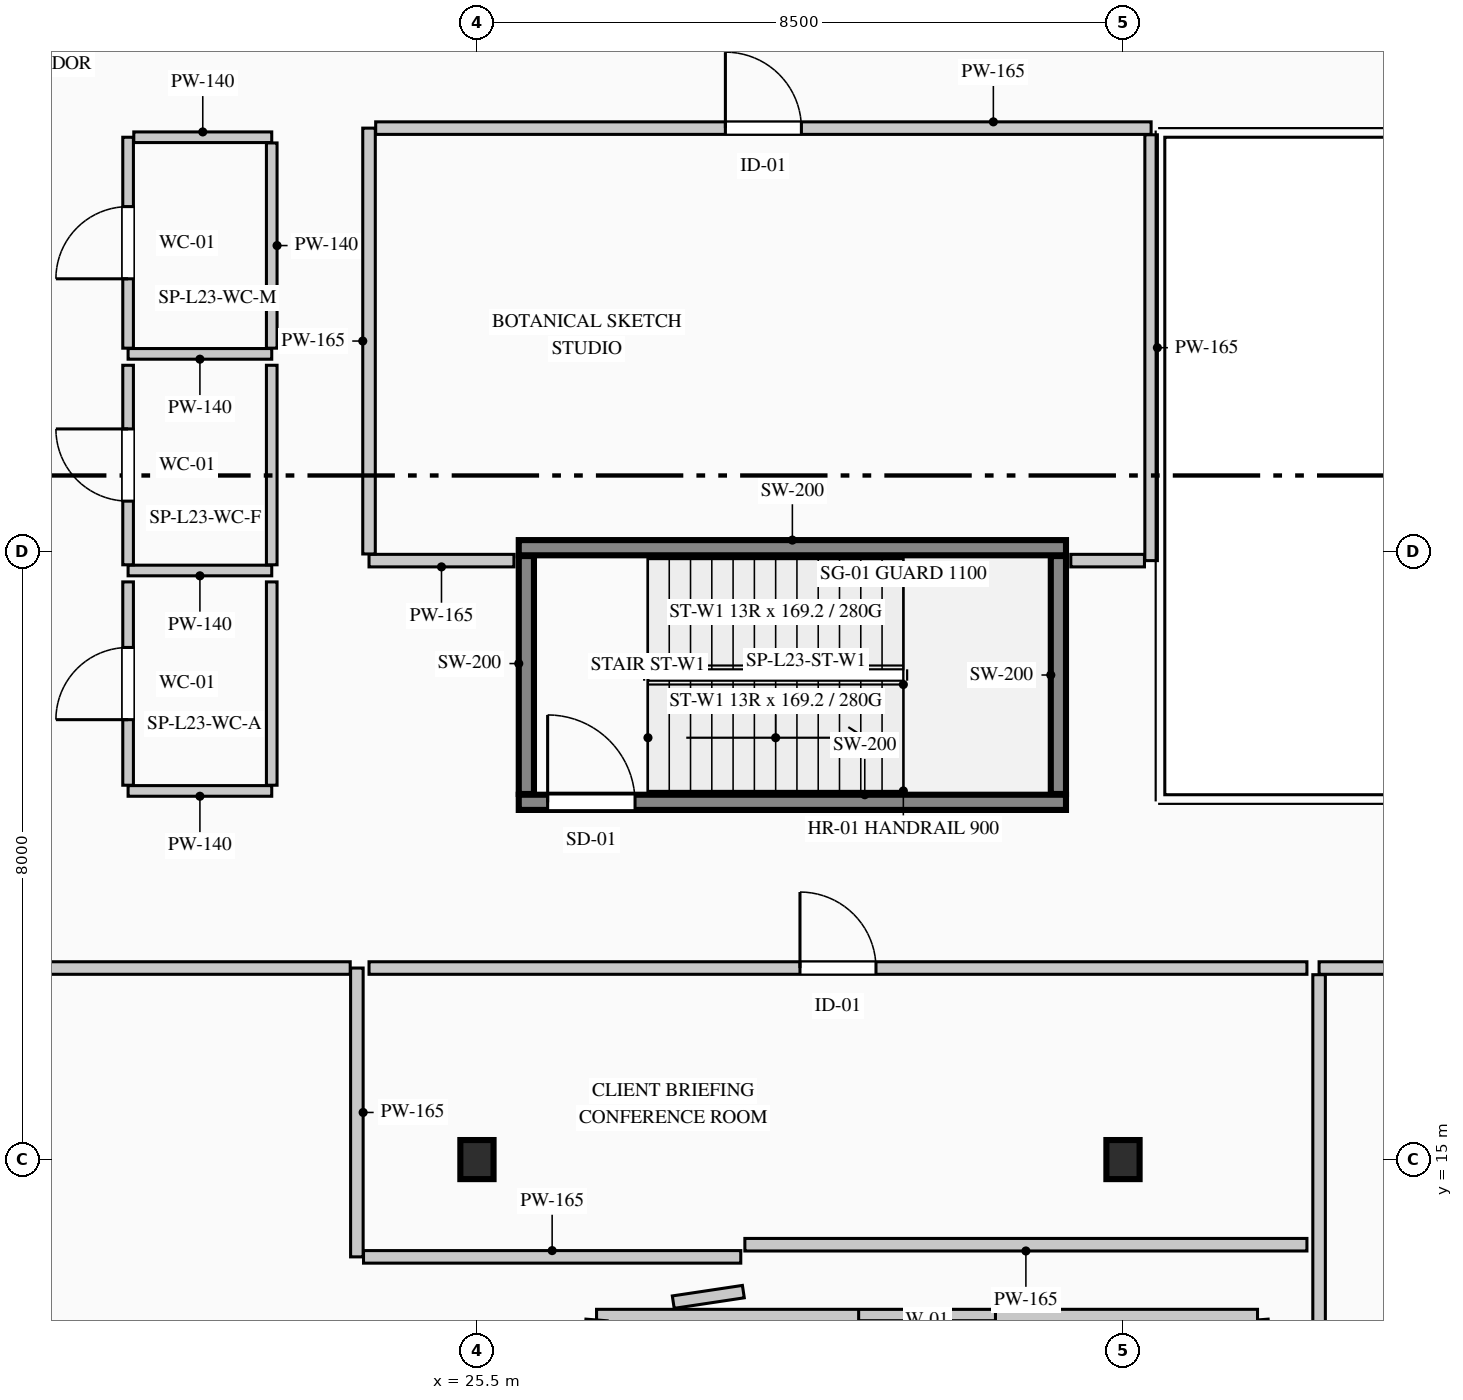
"""IFC4 building model, lengths in metres.
Left out: names, types, materials, properties, quantities, classifications, styles, units other than length and angle.
Written with IfcOpenShell. Run it as: python <this file> out.ifc"""

import sys

from ifc_helpers import new_model, si_unit, direction, frame, frame_2d, origin, origin_2d, place, context, subcontext, project, spatial, rectangle, i_section, extrude, element, fill, save


model = new_model("IFC4")
c1 = context("Model", 3, precision=1e-05, world=origin(), true_north=direction((0.0, 1.0)))
c2 = subcontext(c1, "Body", "Model", "MODEL_VIEW")
j1 = project(units=[si_unit("LENGTHUNIT", "METRE"), si_unit("PLANEANGLEUNIT", "RADIAN")], contexts=[c1])
p1 = place(None, origin())
s1 = spatial("IfcSite", under=j1, at=p1, CompositionType="ELEMENT")
p2 = place(p1, origin())
s2 = spatial("IfcBuilding", under=s1, at=p2, CompositionType="ELEMENT")
p3 = place(p2, frame((0.0, 0.0, 101.8)))
s3 = spatial("IfcBuildingStorey", under=s2, at=p3, CompositionType="ELEMENT", Elevation=101.8)
p4 = place(p3, frame((26.05, 19.7, 0.0), z_axis=(0.0, 0.0, 1.0), x_axis=(1.0, 0.0, 0.0)))
e1 = element("IfcWall", 1, at=p4, inside=s3, PredefinedType="SHEAR", context=c2, shape_type="SweptSolid", body=[
    extrude(rectangle(XDim=7.2, YDim=0.2, at=frame_2d((3.6, 0.0))), origin(), (0.0, 0.0, 1.0), 4.4),
])
p5 = place(p4, frame((0.38, 0.0, 0.0)))
e2 = element("IfcOpeningElement", 2, at=p5, cuts=e1, PredefinedType="OPENING", context=c2, shape_type="SweptSolid", body=[
    extrude(rectangle(XDim=1.15, YDim=2.2, at=frame_2d((0.575, 1.1))), frame((0.0, 0.11, 0.0), z_axis=(0.0, -1.0, 0.0), x_axis=(1.0, 0.0, 0.0)), (0.0, 0.0, 1.0), 0.22),
])
p6 = place(p3, frame((26.05, 23.05, 0.0), z_axis=(0.0, 0.0, 1.0), x_axis=(1.0, 0.0, 0.0)))
e3 = element("IfcWall", 3, at=p6, inside=s3, PredefinedType="SHEAR", context=c2, shape_type="SweptSolid", body=[
    extrude(rectangle(XDim=7.2, YDim=0.2, at=frame_2d((3.6, 0.0))), origin(), (0.0, 0.0, 1.0), 4.4),
])
for number, where, z_axis, x_axis in (
    (4, (26.15, 19.81, 0.0), (0.0, 0.0, 1.0), (0.0, 1.0, 0.0)),
    (5, (33.15, 19.81, 0.0), (0.0, 0.0, 1.0), (0.0, 1.0, 0.0)),
):
    element("IfcWall", number, at=place(p3, frame(where, z_axis=z_axis, x_axis=x_axis)), inside=s3, PredefinedType="SHEAR", context=c2, shape_type="SweptSolid", body=[
        extrude(rectangle(XDim=3.13, YDim=0.2, at=frame_2d((1.565, 0.0))), origin(), (0.0, 0.0, 1.0), 4.4),
    ])
for number, where, z_axis, x_axis in (
    (6, (25.5, 15.0, 0.0), (0.0, 0.0, 1.0), (1.0, 0.0, 0.0)),
    (7, (34.0, 15.0, 0.0), (0.0, 0.0, 1.0), (1.0, 0.0, 0.0)),
):
    element("IfcColumn", number, at=place(p3, frame(where, z_axis=z_axis, x_axis=x_axis)), inside=s3, PredefinedType="COLUMN", context=c2, shape_type="SweptSolid", body=[
        extrude(i_section(OverallWidth=0.437, OverallDepth=0.514, WebThickness=0.061, FlangeThickness=0.077, FilletRadius=0.015, at=origin_2d()), origin(), (0.0, 0.0, 1.0), 4.4),
    ])
p7 = place(p3, frame((36.57, 2.64, 0.0), z_axis=(0.0, 0.0, 1.0), x_axis=(-0.077816860153, 0.996967670627, 0.0)))
e8 = element("IfcWall", 8, at=p7, inside=s3, PredefinedType="STANDARD", context=c2, shape_type="SweptSolid", body=[
    extrude(rectangle(XDim=10.281, YDim=0.28, at=frame_2d((5.141, 0.0))), origin(), (0.0, 0.0, 1.0), 4.05),
])
p8 = place(p7, frame((5.68, 0.0, 0.9)))
e9 = element("IfcOpeningElement", 9, at=p8, cuts=e8, PredefinedType="OPENING", context=c2, shape_type="SweptSolid", body=[
    extrude(rectangle(XDim=1.8, YDim=2.1, at=frame_2d((0.9, 1.05))), frame((0.0, 0.15, 0.0), z_axis=(0.0, -1.0, 0.0), x_axis=(1.0, 0.0, 0.0)), (0.0, 0.0, 1.0), 0.3),
])
p9 = place(p3, frame((35.77, 12.89, 0.0), z_axis=(0.0, 0.0, 1.0), x_axis=(-1.0, 0.0, 0.0)))
e10 = element("IfcWall", 10, at=p9, inside=s3, PredefinedType="STANDARD", context=c2, shape_type="SweptSolid", body=[
    extrude(rectangle(XDim=8.697, YDim=0.28, at=frame_2d((4.348, 0.0))), origin(), (0.0, 0.0, 1.0), 4.05),
])
p10 = place(p9, frame((3.448, 0.0, 0.9)))
e11 = element("IfcOpeningElement", 11, at=p10, cuts=e10, PredefinedType="OPENING", context=c2, shape_type="SweptSolid", body=[
    extrude(rectangle(XDim=1.8, YDim=2.1, at=frame_2d((0.9, 1.05))), frame((0.0, 0.15, 0.0), z_axis=(0.0, -1.0, 0.0), x_axis=(1.0, 0.0, 0.0)), (0.0, 0.0, 1.0), 0.3),
])
p11 = place(p3, frame((27.073, 12.89, 0.0), z_axis=(0.0, 0.0, 1.0), x_axis=(-0.077816860153, -0.996967670627, 0.0)))
e12 = element("IfcWall", 12, at=p11, inside=s3, PredefinedType="STANDARD", context=c2, shape_type="SweptSolid", body=[
    extrude(rectangle(XDim=10.281, YDim=0.28, at=frame_2d((5.141, 0.0))), origin(), (0.0, 0.0, 1.0), 4.05),
])
p12 = place(p11, frame((2.801, 0.0, 0.9)))
e13 = element("IfcOpeningElement", 13, at=p12, cuts=e12, PredefinedType="OPENING", context=c2, shape_type="SweptSolid", body=[
    extrude(rectangle(XDim=1.8, YDim=2.1, at=frame_2d((0.9, 1.05))), frame((0.0, 0.15, 0.0), z_axis=(0.0, -1.0, 0.0), x_axis=(1.0, 0.0, 0.0)), (0.0, 0.0, 1.0), 0.3),
])
p13 = place(p3, frame((22.8, 25.6, 0.0), z_axis=(0.0, 0.0, 1.0), x_axis=(-1.0, 0.0, 0.0)))
e14 = element("IfcWall", 14, at=p13, inside=s3, PredefinedType="PARTITIONING", context=c2, shape_type="SweptSolid", body=[
    extrude(rectangle(XDim=1.89, YDim=0.14, at=frame_2d((0.945, 0.0))), origin(), (0.0, 0.0, 1.0), 4.05),
])
p14 = place(p3, frame((20.91, 25.675, 0.0), z_axis=(0.0, 0.0, 1.0), x_axis=(0.0, 1.0, 0.0)))
e15 = element("IfcWall", 15, at=p14, inside=s3, PredefinedType="PARTITIONING", context=c2, shape_type="SweptSolid", body=[
    extrude(rectangle(XDim=2.775, YDim=0.14, at=frame_2d((1.387, 0.0))), origin(), (0.0, 0.0, 1.0), 4.05),
])
p15 = place(p14, frame((0.913, 0.0, 0.0)))
e16 = element("IfcOpeningElement", 16, at=p15, cuts=e15, PredefinedType="OPENING", context=c2, shape_type="SweptSolid", body=[
    extrude(rectangle(XDim=0.95, YDim=2.15, at=frame_2d((0.475, 1.075))), frame((0.0, 0.08, 0.0), z_axis=(0.0, -1.0, 0.0), x_axis=(1.0, 0.0, 0.0)), (0.0, 0.0, 1.0), 0.16),
])
p16 = place(p3, frame((20.985, 28.45, 0.0), z_axis=(0.0, 0.0, 1.0), x_axis=(1.0, 0.0, 0.0)))
e17 = element("IfcWall", 17, at=p16, inside=s3, PredefinedType="PARTITIONING", context=c2, shape_type="SweptSolid", body=[
    extrude(rectangle(XDim=1.815, YDim=0.14, at=frame_2d((0.907, 0.0))), origin(), (0.0, 0.0, 1.0), 4.05),
])
p17 = place(p3, frame((22.8, 28.375, 0.0), z_axis=(0.0, 0.0, 1.0), x_axis=(0.0, -1.0, 0.0)))
e18 = element("IfcWall", 18, at=p17, inside=s3, PredefinedType="PARTITIONING", context=c2, shape_type="SweptSolid", body=[
    extrude(rectangle(XDim=2.7, YDim=0.14, at=frame_2d((1.35, 0.0))), origin(), (0.0, 0.0, 1.0), 3.635),
])
p18 = place(p3, frame((22.8, 22.75, 0.0), z_axis=(0.0, 0.0, 1.0), x_axis=(-1.0, 0.0, 0.0)))
e19 = element("IfcWall", 19, at=p18, inside=s3, PredefinedType="PARTITIONING", context=c2, shape_type="SweptSolid", body=[
    extrude(rectangle(XDim=1.89, YDim=0.14, at=frame_2d((0.945, 0.0))), origin(), (0.0, 0.0, 1.0), 4.05),
])
p19 = place(p3, frame((20.91, 22.825, 0.0), z_axis=(0.0, 0.0, 1.0), x_axis=(0.0, 1.0, 0.0)))
e20 = element("IfcWall", 20, at=p19, inside=s3, PredefinedType="PARTITIONING", context=c2, shape_type="SweptSolid", body=[
    extrude(rectangle(XDim=2.625, YDim=0.14, at=frame_2d((1.312, 0.0))), origin(), (0.0, 0.0, 1.0), 4.05),
])
p20 = place(p19, frame((0.837, 0.0, 0.0)))
e21 = element("IfcOpeningElement", 21, at=p20, cuts=e20, PredefinedType="OPENING", context=c2, shape_type="SweptSolid", body=[
    extrude(rectangle(XDim=0.95, YDim=2.15, at=frame_2d((0.475, 1.075))), frame((0.0, 0.08, 0.0), z_axis=(0.0, -1.0, 0.0), x_axis=(1.0, 0.0, 0.0)), (0.0, 0.0, 1.0), 0.16),
])
p21 = place(p3, frame((22.8, 25.45, 0.0), z_axis=(0.0, 0.0, 1.0), x_axis=(0.0, -1.0, 0.0)))
e22 = element("IfcWall", 22, at=p21, inside=s3, PredefinedType="PARTITIONING", context=c2, shape_type="SweptSolid", body=[
    extrude(rectangle(XDim=2.625, YDim=0.14, at=frame_2d((1.312, 0.0))), origin(), (0.0, 0.0, 1.0), 3.635),
])
p22 = place(p3, frame((22.8, 19.85, 0.0), z_axis=(0.0, 0.0, 1.0), x_axis=(-1.0, 0.0, 0.0)))
e23 = element("IfcWall", 23, at=p22, inside=s3, PredefinedType="PARTITIONING", context=c2, shape_type="SweptSolid", body=[
    extrude(rectangle(XDim=1.89, YDim=0.14, at=frame_2d((0.945, 0.0))), origin(), (0.0, 0.0, 1.0), 4.05),
])
p23 = place(p3, frame((20.91, 19.925, 0.0), z_axis=(0.0, 0.0, 1.0), x_axis=(0.0, 1.0, 0.0)))
e24 = element("IfcWall", 24, at=p23, inside=s3, PredefinedType="PARTITIONING", context=c2, shape_type="SweptSolid", body=[
    extrude(rectangle(XDim=2.675, YDim=0.14, at=frame_2d((1.337, 0.0))), origin(), (0.0, 0.0, 1.0), 4.05),
])
p24 = place(p23, frame((0.863, 0.0, 0.0)))
e25 = element("IfcOpeningElement", 25, at=p24, cuts=e24, PredefinedType="OPENING", context=c2, shape_type="SweptSolid", body=[
    extrude(rectangle(XDim=0.95, YDim=2.15, at=frame_2d((0.475, 1.075))), frame((0.0, 0.08, 0.0), z_axis=(0.0, -1.0, 0.0), x_axis=(1.0, 0.0, 0.0)), (0.0, 0.0, 1.0), 0.16),
])
p25 = place(p3, frame((22.8, 22.6, 0.0), z_axis=(0.0, 0.0, 1.0), x_axis=(0.0, -1.0, 0.0)))
e26 = element("IfcWall", 26, at=p25, inside=s3, PredefinedType="PARTITIONING", context=c2, shape_type="SweptSolid", body=[
    extrude(rectangle(XDim=2.675, YDim=0.14, at=frame_2d((1.337, 0.0))), origin(), (0.0, 0.0, 1.0), 3.635),
])
p26 = place(p3, frame((23.92, 17.52, 0.0), z_axis=(0.0, 0.0, 1.0), x_axis=(0.0, -1.0, 0.0)))
e27 = element("IfcWall", 27, at=p26, inside=s3, PredefinedType="PARTITIONING", context=c2, shape_type="SweptSolid", body=[
    extrude(rectangle(XDim=3.8, YDim=0.165, at=frame_2d((1.9, 0.0))), origin(), (0.0, 0.0, 1.0), 4.05),
])
p27 = place(p3, frame((24.008, 13.72, 0.0), z_axis=(0.0, 0.0, 1.0), x_axis=(1.0, 0.0, 0.0)))
e28 = element("IfcWall", 28, at=p27, inside=s3, PredefinedType="PARTITIONING", context=c2, shape_type="SweptSolid", body=[
    extrude(rectangle(XDim=4.963, YDim=0.165, at=frame_2d((2.482, 0.0))), origin(), (0.0, 0.0, 1.0), 4.05),
])
p28 = place(p3, frame((29.005, 13.263, 0.0), z_axis=(0.0, 0.0, 1.0), x_axis=(-0.988919061759, -0.148455681233, 0.0)))
e29 = element("IfcWall", 29, at=p28, inside=s3, PredefinedType="PARTITIONING", context=c2, shape_type="SweptSolid", body=[
    extrude(rectangle(XDim=0.932, YDim=0.165, at=frame_2d((0.466, 0.0))), origin(), (0.0, 0.0, 1.0), 4.05),
])
p29 = place(p3, frame((12.367, 17.52, 0.0), z_axis=(0.0, 0.0, 1.0), x_axis=(1.0, 0.0, 0.0)))
e30 = element("IfcWall", 30, at=p29, inside=s3, PredefinedType="PARTITIONING", context=c2, shape_type="SweptSolid", body=[
    extrude(rectangle(XDim=11.465, YDim=0.165, at=frame_2d((5.732, 0.0))), origin(), (0.0, 0.0, 1.0), 4.05),
])
p30 = place(p29, frame((5.232, 0.0, 0.0)))
e31 = element("IfcOpeningElement", 31, at=p30, cuts=e30, PredefinedType="OPENING", context=c2, shape_type="SweptSolid", body=[
    extrude(rectangle(XDim=1.0, YDim=2.15, at=frame_2d((0.5, 1.075))), frame((0.0, 0.093, 0.0), z_axis=(0.0, -1.0, 0.0), x_axis=(1.0, 0.0, 0.0)), (0.0, 0.0, 1.0), 0.185),
])
p31 = place(p3, frame((36.58, 17.52, 0.0), z_axis=(0.0, 0.0, 1.0), x_axis=(1.0, 0.0, 0.0)))
e32 = element("IfcWall", 32, at=p31, inside=s3, PredefinedType="PARTITIONING", context=c2, shape_type="SweptSolid", body=[
    extrude(rectangle(XDim=8.4, YDim=0.165, at=frame_2d((4.2, 0.0))), origin(), (0.0, 0.0, 1.0), 4.05),
])
p32 = place(p31, frame((3.7, 0.0, 0.0)))
e33 = element("IfcOpeningElement", 33, at=p32, cuts=e32, PredefinedType="OPENING", context=c2, shape_type="SweptSolid", body=[
    extrude(rectangle(XDim=1.0, YDim=2.15, at=frame_2d((0.5, 1.075))), frame((0.0, 0.093, 0.0), z_axis=(0.0, -1.0, 0.0), x_axis=(1.0, 0.0, 0.0)), (0.0, 0.0, 1.0), 0.185),
])
p33 = place(p3, frame((36.58, 5.525, 0.0), z_axis=(0.0, 0.0, 1.0), x_axis=(0.0, 1.0, 0.0)))
e34 = element("IfcWall", 34, at=p33, inside=s3, PredefinedType="PARTITIONING", context=c2, shape_type="SweptSolid", body=[
    extrude(rectangle(XDim=11.907, YDim=0.165, at=frame_2d((5.954, 0.0))), origin(), (0.0, 0.0, 1.0), 4.05),
])
p34 = place(p3, frame((24.08, 17.52, 0.0), z_axis=(0.0, 0.0, 1.0), x_axis=(1.0, 0.0, 0.0)))
e35 = element("IfcWall", 35, at=p34, inside=s3, PredefinedType="PARTITIONING", context=c2, shape_type="SweptSolid", body=[
    extrude(rectangle(XDim=12.34, YDim=0.165, at=frame_2d((6.17, 0.0))), origin(), (0.0, 0.0, 1.0), 3.635),
])
p35 = place(p34, frame((5.67, 0.0, 0.0)))
e36 = element("IfcOpeningElement", 36, at=p35, cuts=e35, PredefinedType="OPENING", context=c2, shape_type="SweptSolid", body=[
    extrude(rectangle(XDim=1.0, YDim=2.15, at=frame_2d((0.5, 1.075))), frame((0.0, 0.093, 0.0), z_axis=(0.0, -1.0, 0.0), x_axis=(1.0, 0.0, 0.0)), (0.0, 0.0, 1.0), 0.185),
])
p36 = place(p3, frame((36.42, 13.88, 0.0), z_axis=(0.0, 0.0, 1.0), x_axis=(-1.0, 0.0, 0.0)))
e37 = element("IfcWall", 37, at=p36, inside=s3, PredefinedType="PARTITIONING", context=c2, shape_type="SweptSolid", body=[
    extrude(rectangle(XDim=7.395, YDim=0.165, at=frame_2d((3.698, 0.0))), origin(), (0.0, 0.0, 1.0), 4.05),
])
p37 = place(p3, frame((25.987, 22.88, 0.0), z_axis=(0.0, 0.0, 1.0), x_axis=(-1.0, 0.0, 0.0)))
e38 = element("IfcWall", 38, at=p37, inside=s3, PredefinedType="PARTITIONING", context=c2, shape_type="SweptSolid", body=[
    extrude(rectangle(XDim=1.907, YDim=0.165, at=frame_2d((0.953, 0.0))), origin(), (0.0, 0.0, 1.0), 4.05),
])
p38 = place(p3, frame((24.08, 22.968, 0.0), z_axis=(0.0, 0.0, 1.0), x_axis=(0.0, 1.0, 0.0)))
e39 = element("IfcWall", 39, at=p38, inside=s3, PredefinedType="PARTITIONING", context=c2, shape_type="SweptSolid", body=[
    extrude(rectangle(XDim=5.603, YDim=0.165, at=frame_2d((2.801, 0.0))), origin(), (0.0, 0.0, 1.0), 4.05),
])
p39 = place(p3, frame((24.167, 28.57, 0.0), z_axis=(0.0, 0.0, 1.0), x_axis=(1.0, 0.0, 0.0)))
e40 = element("IfcWall", 40, at=p39, inside=s3, PredefinedType="PARTITIONING", context=c2, shape_type="SweptSolid", body=[
    extrude(rectangle(XDim=10.203, YDim=0.165, at=frame_2d((5.101, 0.0))), origin(), (0.0, 0.0, 1.0), 3.635),
])
p40 = place(p39, frame((4.601, 0.0, 0.0)))
e41 = element("IfcOpeningElement", 41, at=p40, cuts=e40, PredefinedType="OPENING", context=c2, shape_type="SweptSolid", body=[
    extrude(rectangle(XDim=1.0, YDim=2.15, at=frame_2d((0.5, 1.075))), frame((0.0, 0.093, 0.0), z_axis=(0.0, -1.0, 0.0), x_axis=(1.0, 0.0, 0.0)), (0.0, 0.0, 1.0), 0.185),
])
p41 = place(p3, frame((34.37, 28.482, 0.0), z_axis=(0.0, 0.0, 1.0), x_axis=(0.0, -1.0, 0.0)))
e42 = element("IfcWall", 42, at=p41, inside=s3, PredefinedType="PARTITIONING", context=c2, shape_type="SweptSolid", body=[
    extrude(rectangle(XDim=5.603, YDim=0.165, at=frame_2d((2.801, 0.0))), origin(), (0.0, 0.0, 1.0), 4.05),
])
p42 = place(p3, frame((34.282, 22.88, 0.0), z_axis=(0.0, 0.0, 1.0), x_axis=(-1.0, 0.0, 0.0)))
e43 = element("IfcWall", 43, at=p42, inside=s3, PredefinedType="PARTITIONING", context=c2, shape_type="SweptSolid", body=[
    extrude(rectangle(XDim=0.969, YDim=0.165, at=frame_2d((0.485, 0.0))), origin(), (0.0, 0.0, 1.0), 4.05),
])
p43 = place(p10, origin())
e44 = element("IfcWindow", 44, at=p43, inside=s3, PartitioningType="SINGLE_PANEL", PredefinedType="WINDOW", context=c2, shape_type="SweptSolid", body=[
    extrude(rectangle(XDim=1.8, YDim=2.1, at=frame_2d((0.9, 1.05))), frame((0.0, 0.03, 0.0), z_axis=(0.0, -1.0, 0.0), x_axis=(1.0, 0.0, 0.0)), (0.0, 0.0, 1.0), 0.06),
])
fill(e11, e44)
p44 = place(p5, origin())
e45 = element("IfcDoor", 45, at=p44, inside=s3, OperationType="SINGLE_SWING_LEFT", PredefinedType="DOOR", context=c2, shape_type="SweptSolid", body=[
    extrude(rectangle(XDim=1.15, YDim=2.2, at=frame_2d((0.575, 1.1))), frame((0.0, 0.025, 0.0), z_axis=(0.0, -1.0, 0.0), x_axis=(1.0, 0.0, 0.0)), (0.0, 0.0, 1.0), 0.05),
])
fill(e2, e45)
p45 = place(p15, origin())
e46 = element("IfcDoor", 46, at=p45, inside=s3, OperationType="SINGLE_SWING_LEFT", PredefinedType="DOOR", context=c2, shape_type="SweptSolid", body=[
    extrude(rectangle(XDim=0.95, YDim=2.15, at=frame_2d((0.475, 1.075))), frame((0.0, 0.025, 0.0), z_axis=(0.0, -1.0, 0.0), x_axis=(1.0, 0.0, 0.0)), (0.0, 0.0, 1.0), 0.05),
])
fill(e16, e46)
p46 = place(p20, origin())
e47 = element("IfcDoor", 47, at=p46, inside=s3, OperationType="SINGLE_SWING_RIGHT", PredefinedType="DOOR", context=c2, shape_type="SweptSolid", body=[
    extrude(rectangle(XDim=0.95, YDim=2.15, at=frame_2d((0.475, 1.075))), frame((0.0, 0.025, 0.0), z_axis=(0.0, -1.0, 0.0), x_axis=(1.0, 0.0, 0.0)), (0.0, 0.0, 1.0), 0.05),
])
fill(e21, e47)
p47 = place(p24, origin())
e48 = element("IfcDoor", 48, at=p47, inside=s3, OperationType="SINGLE_SWING_LEFT", PredefinedType="DOOR", context=c2, shape_type="SweptSolid", body=[
    extrude(rectangle(XDim=0.95, YDim=2.15, at=frame_2d((0.475, 1.075))), frame((0.0, 0.025, 0.0), z_axis=(0.0, -1.0, 0.0), x_axis=(1.0, 0.0, 0.0)), (0.0, 0.0, 1.0), 0.05),
])
fill(e25, e48)
p48 = place(p35, origin())
e49 = element("IfcDoor", 49, at=p48, inside=s3, OperationType="SINGLE_SWING_LEFT", PredefinedType="DOOR", context=c2, shape_type="SweptSolid", body=[
    extrude(rectangle(XDim=1.0, YDim=2.15, at=frame_2d((0.5, 1.075))), frame((0.0, 0.025, 0.0), z_axis=(0.0, -1.0, 0.0), x_axis=(1.0, 0.0, 0.0)), (0.0, 0.0, 1.0), 0.05),
])
fill(e36, e49)
p49 = place(p40, origin())
e50 = element("IfcDoor", 50, at=p49, inside=s3, OperationType="SINGLE_SWING_LEFT", PredefinedType="DOOR", context=c2, shape_type="SweptSolid", body=[
    extrude(rectangle(XDim=1.0, YDim=2.15, at=frame_2d((0.5, 1.075))), frame((0.0, 0.025, 0.0), z_axis=(0.0, -1.0, 0.0), x_axis=(1.0, 0.0, 0.0)), (0.0, 0.0, 1.0), 0.05),
])
fill(e41, e50)
save(model, sys.argv[1])
